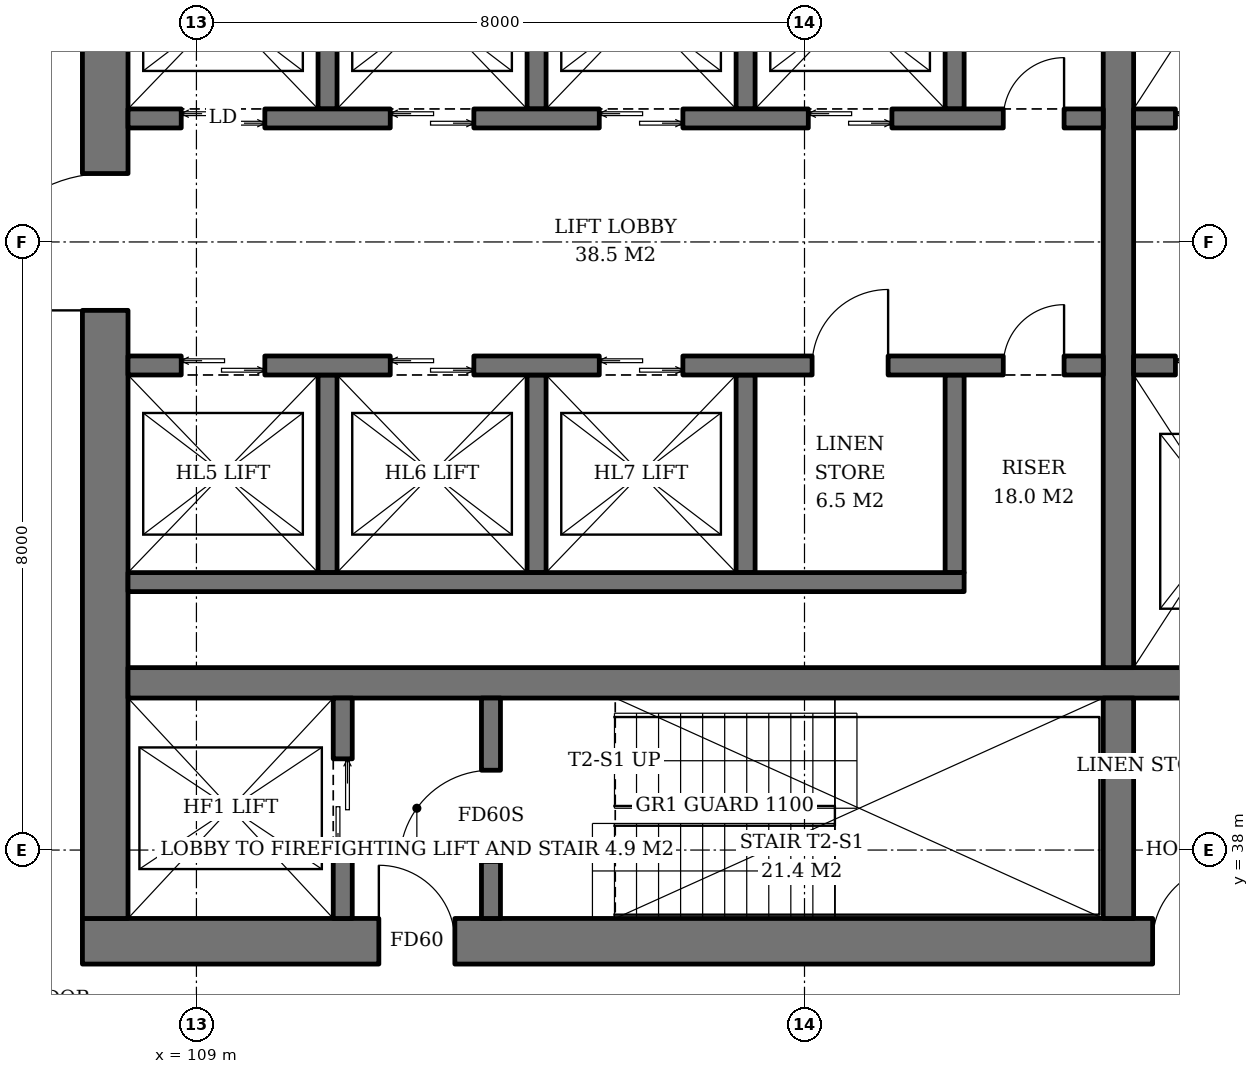
"""IFC4 building model, lengths in metres.
Left out: names, types, materials, properties, quantities, classifications, styles, units other than length and angle.
Written with IfcOpenShell. Run it as: python <this file> out.ifc"""

import sys

from ifc_helpers import new_model, si_unit, direction, frame, frame_2d, origin, place, context, subcontext, project, spatial, rectangle, extrude, element, fill, save


model = new_model("IFC4")
c1 = context("Model", 3, precision=1e-05, world=origin(), true_north=direction((0.0, 1.0)))
c2 = subcontext(c1, "Body", "Model", "MODEL_VIEW")
j1 = project(units=[si_unit("LENGTHUNIT", "METRE"), si_unit("PLANEANGLEUNIT", "RADIAN")], contexts=[c1])
p1 = place(None, origin())
s1 = spatial("IfcSite", under=j1, at=p1, CompositionType="ELEMENT")
p2 = place(p1, origin())
s2 = spatial("IfcBuilding", under=s1, at=p2, CompositionType="ELEMENT")
p3 = place(p2, frame((0.0, 0.0, 100.8)))
s3 = spatial("IfcBuildingStorey", under=s2, at=p3, CompositionType="ELEMENT", Elevation=100.8)
p4 = place(p3, frame((107.5, 36.8, 0.0), z_axis=(0.0, 0.0, 1.0), x_axis=(1.0, 0.0, 0.0)))
e1 = element("IfcWall", 1, at=p4, inside=s3, PredefinedType="SHEAR", context=c2, shape_type="SweptSolid", body=[
    extrude(rectangle(XDim=19.0, YDim=0.6, at=frame_2d((9.5, 0.0))), origin(), (0.0, 0.0, 1.0), 3.8),
])
p5 = place(p4, frame((3.9, 0.0, 0.0)))
e2 = element("IfcOpeningElement", 2, at=p5, cuts=e1, PredefinedType="OPENING", context=c2, shape_type="SweptSolid", body=[
    extrude(rectangle(XDim=1.0, YDim=2.1, at=frame_2d((0.5, 1.05))), frame((0.0, 0.31, 0.0), z_axis=(0.0, -1.0, 0.0), x_axis=(1.0, 0.0, 0.0)), (0.0, 0.0, 1.0), 0.62),
])
p6 = place(p4, frame((14.08, 0.0, 0.0)))
e3 = element("IfcOpeningElement", 3, at=p6, cuts=e1, PredefinedType="OPENING", context=c2, shape_type="SweptSolid", body=[
    extrude(rectangle(XDim=1.0, YDim=2.1, at=frame_2d((0.5, 1.05))), frame((0.0, 0.31, 0.0), z_axis=(0.0, -1.0, 0.0), x_axis=(1.0, 0.0, 0.0)), (0.0, 0.0, 1.0), 0.62),
])
p7 = place(p4, frame((15.615, 0.0, 0.0)))
e4 = element("IfcOpeningElement", 4, at=p7, cuts=e1, PredefinedType="OPENING", context=c2, shape_type="SweptSolid", body=[
    extrude(rectangle(XDim=1.0, YDim=2.1, at=frame_2d((0.5, 1.05))), frame((0.0, 0.31, 0.0), z_axis=(0.0, -1.0, 0.0), x_axis=(1.0, 0.0, 0.0)), (0.0, 0.0, 1.0), 0.62),
])
p8 = place(p4, frame((17.188, 0.0, 0.0)))
e5 = element("IfcOpeningElement", 5, at=p8, cuts=e1, PredefinedType="OPENING", context=c2, shape_type="SweptSolid", body=[
    extrude(rectangle(XDim=1.0, YDim=2.1, at=frame_2d((0.5, 1.05))), frame((0.0, 0.31, 0.0), z_axis=(0.0, -1.0, 0.0), x_axis=(1.0, 0.0, 0.0)), (0.0, 0.0, 1.0), 0.62),
])
p9 = place(p3, frame((107.8, 37.1, 0.0), z_axis=(0.0, 0.0, 1.0), x_axis=(0.0, 1.0, 0.0)))
e6 = element("IfcWall", 6, at=p9, inside=s3, PredefinedType="SHEAR", context=c2, shape_type="SweptSolid", body=[
    extrude(rectangle(XDim=17.8, YDim=0.6, at=frame_2d((8.9, 0.0))), origin(), (0.0, 0.0, 1.0), 3.8),
])
p10 = place(p9, frame((8.0, 0.0, 0.0)))
e7 = element("IfcOpeningElement", 7, at=p10, cuts=e6, PredefinedType="OPENING", context=c2, shape_type="SweptSolid", body=[
    extrude(rectangle(XDim=1.8, YDim=2.4, at=frame_2d((0.9, 1.2))), frame((0.0, 0.31, 0.0), z_axis=(0.0, -1.0, 0.0), x_axis=(1.0, 0.0, 0.0)), (0.0, 0.0, 1.0), 0.62),
])
p11 = place(p3, frame((108.1, 40.2, 0.0), z_axis=(0.0, 0.0, 1.0), x_axis=(1.0, 0.0, 0.0)))
e8 = element("IfcWall", 8, at=p11, inside=s3, PredefinedType="SHEAR", context=c2, shape_type="SweptSolid", body=[
    extrude(rectangle(XDim=17.8, YDim=0.4, at=frame_2d((8.9, 0.0))), origin(), (0.0, 0.0, 1.0), 3.8),
])
p12 = place(p3, frame((121.13, 37.1, 0.0), z_axis=(0.0, 0.0, 1.0), x_axis=(0.0, 1.0, 0.0)))
e9 = element("IfcWall", 9, at=p12, inside=s3, PredefinedType="SHEAR", context=c2, shape_type="SweptSolid", body=[
    extrude(rectangle(XDim=2.9, YDim=0.4, at=frame_2d((1.45, 0.0))), origin(), (0.0, 0.0, 1.0), 3.8),
])
p13 = place(p3, frame((121.13, 40.4, 0.0), z_axis=(0.0, 0.0, 1.0), x_axis=(0.0, 1.0, 0.0)))
e10 = element("IfcWall", 10, at=p13, inside=s3, PredefinedType="SHEAR", context=c2, shape_type="SweptSolid", body=[
    extrude(rectangle(XDim=11.2, YDim=0.4, at=frame_2d((5.6, 0.0))), origin(), (0.0, 0.0, 1.0), 3.8),
])
p14 = place(p3, frame((110.925, 37.1, 0.0), z_axis=(0.0, 0.0, 1.0), x_axis=(0.0, 1.0, 0.0)))
e11 = element("IfcWall", 11, at=p14, inside=s3, PredefinedType="SHEAR", context=c2, shape_type="SweptSolid", body=[
    extrude(rectangle(XDim=2.9, YDim=0.25, at=frame_2d((1.45, 0.0))), origin(), (0.0, 0.0, 1.0), 3.8),
])
p15 = place(p14, frame((0.8, 0.0, 0.0)))
e12 = element("IfcOpeningElement", 12, at=p15, cuts=e11, PredefinedType="OPENING", context=c2, shape_type="SweptSolid", body=[
    extrude(rectangle(XDim=1.3, YDim=2.2, at=frame_2d((0.65, 1.1))), frame((0.0, 0.135, 0.0), z_axis=(0.0, -1.0, 0.0), x_axis=(1.0, 0.0, 0.0)), (0.0, 0.0, 1.0), 0.27),
])
p16 = place(p3, frame((112.875, 37.1, 0.0), z_axis=(0.0, 0.0, 1.0), x_axis=(0.0, 1.0, 0.0)))
e13 = element("IfcWall", 13, at=p16, inside=s3, PredefinedType="SHEAR", context=c2, shape_type="SweptSolid", body=[
    extrude(rectangle(XDim=2.9, YDim=0.25, at=frame_2d((1.45, 0.0))), origin(), (0.0, 0.0, 1.0), 3.8),
])
p17 = place(p16, frame((0.75, 0.0, 0.0)))
e14 = element("IfcOpeningElement", 14, at=p17, cuts=e13, PredefinedType="OPENING", context=c2, shape_type="SweptSolid", body=[
    extrude(rectangle(XDim=1.2, YDim=2.1, at=frame_2d((0.6, 1.05))), frame((0.0, 0.135, 0.0), z_axis=(0.0, -1.0, 0.0), x_axis=(1.0, 0.0, 0.0)), (0.0, 0.0, 1.0), 0.27),
])
for number, where, z_axis, x_axis in (
    (15, (110.725, 47.75, 0.0), (0.0, 0.0, 1.0), (0.0, 1.0, 0.0)),
    (16, (113.475, 47.75, 0.0), (0.0, 0.0, 1.0), (0.0, 1.0, 0.0)),
    (17, (116.225, 47.75, 0.0), (0.0, 0.0, 1.0), (0.0, 1.0, 0.0)),
    (18, (118.975, 47.75, 0.0), (0.0, 0.0, 1.0), (0.0, 1.0, 0.0)),
):
    element("IfcWall", number, at=place(p3, frame(where, z_axis=z_axis, x_axis=x_axis)), inside=s3, PredefinedType="SHEAR", context=c2, shape_type="SweptSolid", body=[
        extrude(rectangle(XDim=2.6, YDim=0.25, at=frame_2d((1.3, 0.0))), origin(), (0.0, 0.0, 1.0), 3.8),
    ])
p18 = place(p3, frame((108.1, 47.625, 0.0), z_axis=(0.0, 0.0, 1.0), x_axis=(1.0, 0.0, 0.0)))
e19 = element("IfcWall", 19, at=p18, inside=s3, PredefinedType="SHEAR", context=c2, shape_type="SweptSolid", body=[
    extrude(rectangle(XDim=12.83, YDim=0.25, at=frame_2d((6.415, 0.0))), origin(), (0.0, 0.0, 1.0), 3.8),
])
p19 = place(p18, frame((0.7, 0.0, 0.0)))
e20 = element("IfcOpeningElement", 20, at=p19, cuts=e19, PredefinedType="OPENING", context=c2, shape_type="SweptSolid", body=[
    extrude(rectangle(XDim=1.1, YDim=2.2, at=frame_2d((0.55, 1.1))), frame((0.0, 0.135, 0.0), z_axis=(0.0, -1.0, 0.0), x_axis=(1.0, 0.0, 0.0)), (0.0, 0.0, 1.0), 0.27),
])
p20 = place(p18, frame((3.45, 0.0, 0.0)))
e21 = element("IfcOpeningElement", 21, at=p20, cuts=e19, PredefinedType="OPENING", context=c2, shape_type="SweptSolid", body=[
    extrude(rectangle(XDim=1.1, YDim=2.2, at=frame_2d((0.55, 1.1))), frame((0.0, 0.135, 0.0), z_axis=(0.0, -1.0, 0.0), x_axis=(1.0, 0.0, 0.0)), (0.0, 0.0, 1.0), 0.27),
])
p21 = place(p18, frame((6.2, 0.0, 0.0)))
e22 = element("IfcOpeningElement", 22, at=p21, cuts=e19, PredefinedType="OPENING", context=c2, shape_type="SweptSolid", body=[
    extrude(rectangle(XDim=1.1, YDim=2.2, at=frame_2d((0.55, 1.1))), frame((0.0, 0.135, 0.0), z_axis=(0.0, -1.0, 0.0), x_axis=(1.0, 0.0, 0.0)), (0.0, 0.0, 1.0), 0.27),
])
p22 = place(p18, frame((8.95, 0.0, 0.0)))
e23 = element("IfcOpeningElement", 23, at=p22, cuts=e19, PredefinedType="OPENING", context=c2, shape_type="SweptSolid", body=[
    extrude(rectangle(XDim=1.1, YDim=2.2, at=frame_2d((0.55, 1.1))), frame((0.0, 0.135, 0.0), z_axis=(0.0, -1.0, 0.0), x_axis=(1.0, 0.0, 0.0)), (0.0, 0.0, 1.0), 0.27),
])
p23 = place(p18, frame((11.515, 0.0, 0.0)))
e24 = element("IfcOpeningElement", 24, at=p23, cuts=e19, PredefinedType="OPENING", context=c2, shape_type="SweptSolid", body=[
    extrude(rectangle(XDim=0.8, YDim=2.0, at=frame_2d((0.4, 1.0))), frame((0.0, 0.135, 0.0), z_axis=(0.0, -1.0, 0.0), x_axis=(1.0, 0.0, 0.0)), (0.0, 0.0, 1.0), 0.27),
])
for number, where, z_axis, x_axis in (
    (25, (110.725, 44.25, 0.0), (0.0, 0.0, 1.0), (0.0, -1.0, 0.0)),
    (26, (113.475, 44.25, 0.0), (0.0, 0.0, 1.0), (0.0, -1.0, 0.0)),
    (27, (116.225, 44.25, 0.0), (0.0, 0.0, 1.0), (0.0, -1.0, 0.0)),
    (28, (118.975, 44.25, 0.0), (0.0, 0.0, 1.0), (0.0, -1.0, 0.0)),
):
    element("IfcWall", number, at=place(p3, frame(where, z_axis=z_axis, x_axis=x_axis)), inside=s3, PredefinedType="SHEAR", context=c2, shape_type="SweptSolid", body=[
        extrude(rectangle(XDim=2.6, YDim=0.25, at=frame_2d((1.3, 0.0))), origin(), (0.0, 0.0, 1.0), 3.8),
    ])
p24 = place(p3, frame((108.1, 41.525, 0.0), z_axis=(0.0, 0.0, 1.0), x_axis=(1.0, 0.0, 0.0)))
e29 = element("IfcWall", 29, at=p24, inside=s3, PredefinedType="SHEAR", context=c2, shape_type="SweptSolid", body=[
    extrude(rectangle(XDim=11.0, YDim=0.25, at=frame_2d((5.5, 0.0))), origin(), (0.0, 0.0, 1.0), 3.8),
])
p25 = place(p3, frame((108.1, 44.375, 0.0), z_axis=(0.0, 0.0, 1.0), x_axis=(1.0, 0.0, 0.0)))
e30 = element("IfcWall", 30, at=p25, inside=s3, PredefinedType="SHEAR", context=c2, shape_type="SweptSolid", body=[
    extrude(rectangle(XDim=12.83, YDim=0.25, at=frame_2d((6.415, 0.0))), origin(), (0.0, 0.0, 1.0), 3.8),
])
p26 = place(p25, frame((0.7, 0.0, 0.0)))
e31 = element("IfcOpeningElement", 31, at=p26, cuts=e30, PredefinedType="OPENING", context=c2, shape_type="SweptSolid", body=[
    extrude(rectangle(XDim=1.1, YDim=2.2, at=frame_2d((0.55, 1.1))), frame((0.0, 0.135, 0.0), z_axis=(0.0, -1.0, 0.0), x_axis=(1.0, 0.0, 0.0)), (0.0, 0.0, 1.0), 0.27),
])
p27 = place(p25, frame((3.45, 0.0, 0.0)))
e32 = element("IfcOpeningElement", 32, at=p27, cuts=e30, PredefinedType="OPENING", context=c2, shape_type="SweptSolid", body=[
    extrude(rectangle(XDim=1.1, YDim=2.2, at=frame_2d((0.55, 1.1))), frame((0.0, 0.135, 0.0), z_axis=(0.0, -1.0, 0.0), x_axis=(1.0, 0.0, 0.0)), (0.0, 0.0, 1.0), 0.27),
])
p28 = place(p25, frame((6.2, 0.0, 0.0)))
e33 = element("IfcOpeningElement", 33, at=p28, cuts=e30, PredefinedType="OPENING", context=c2, shape_type="SweptSolid", body=[
    extrude(rectangle(XDim=1.1, YDim=2.2, at=frame_2d((0.55, 1.1))), frame((0.0, 0.135, 0.0), z_axis=(0.0, -1.0, 0.0), x_axis=(1.0, 0.0, 0.0)), (0.0, 0.0, 1.0), 0.27),
])
p29 = place(p25, frame((9.0, 0.0, 0.0)))
e34 = element("IfcOpeningElement", 34, at=p29, cuts=e30, PredefinedType="OPENING", context=c2, shape_type="SweptSolid", body=[
    extrude(rectangle(XDim=1.0, YDim=2.1, at=frame_2d((0.5, 1.05))), frame((0.0, 0.135, 0.0), z_axis=(0.0, -1.0, 0.0), x_axis=(1.0, 0.0, 0.0)), (0.0, 0.0, 1.0), 0.27),
])
p30 = place(p25, frame((11.515, 0.0, 0.0)))
e35 = element("IfcOpeningElement", 35, at=p30, cuts=e30, PredefinedType="OPENING", context=c2, shape_type="SweptSolid", body=[
    extrude(rectangle(XDim=0.8, YDim=2.0, at=frame_2d((0.4, 1.0))), frame((0.0, 0.135, 0.0), z_axis=(0.0, -1.0, 0.0), x_axis=(1.0, 0.0, 0.0)), (0.0, 0.0, 1.0), 0.27),
])
p31 = place(p3, frame((121.33, 47.625, 0.0), z_axis=(0.0, 0.0, 1.0), x_axis=(1.0, 0.0, 0.0)))
e36 = element("IfcWall", 36, at=p31, inside=s3, PredefinedType="SHEAR", context=c2, shape_type="SweptSolid", body=[
    extrude(rectangle(XDim=4.57, YDim=0.25, at=frame_2d((2.285, 0.0))), origin(), (0.0, 0.0, 1.0), 3.8),
])
p32 = place(p31, frame((0.55, 0.0, 0.0)))
e37 = element("IfcOpeningElement", 37, at=p32, cuts=e36, PredefinedType="OPENING", context=c2, shape_type="SweptSolid", body=[
    extrude(rectangle(XDim=1.4, YDim=2.4, at=frame_2d((0.7, 1.2))), frame((0.0, 0.135, 0.0), z_axis=(0.0, -1.0, 0.0), x_axis=(1.0, 0.0, 0.0)), (0.0, 0.0, 1.0), 0.27),
])
p33 = place(p31, frame((3.26, 0.0, 0.0)))
e38 = element("IfcOpeningElement", 38, at=p33, cuts=e36, PredefinedType="OPENING", context=c2, shape_type="SweptSolid", body=[
    extrude(rectangle(XDim=0.8, YDim=2.0, at=frame_2d((0.4, 1.0))), frame((0.0, 0.135, 0.0), z_axis=(0.0, -1.0, 0.0), x_axis=(1.0, 0.0, 0.0)), (0.0, 0.0, 1.0), 0.27),
])
p34 = place(p3, frame((121.33, 44.375, 0.0), z_axis=(0.0, 0.0, 1.0), x_axis=(1.0, 0.0, 0.0)))
e39 = element("IfcWall", 39, at=p34, inside=s3, PredefinedType="SHEAR", context=c2, shape_type="SweptSolid", body=[
    extrude(rectangle(XDim=4.57, YDim=0.25, at=frame_2d((2.285, 0.0))), origin(), (0.0, 0.0, 1.0), 3.8),
])
p35 = place(p34, frame((0.55, 0.0, 0.0)))
e40 = element("IfcOpeningElement", 40, at=p35, cuts=e39, PredefinedType="OPENING", context=c2, shape_type="SweptSolid", body=[
    extrude(rectangle(XDim=1.4, YDim=2.4, at=frame_2d((0.7, 1.2))), frame((0.0, 0.135, 0.0), z_axis=(0.0, -1.0, 0.0), x_axis=(1.0, 0.0, 0.0)), (0.0, 0.0, 1.0), 0.27),
])
p36 = place(p34, frame((3.26, 0.0, 0.0)))
e41 = element("IfcOpeningElement", 41, at=p36, cuts=e39, PredefinedType="OPENING", context=c2, shape_type="SweptSolid", body=[
    extrude(rectangle(XDim=0.8, YDim=2.0, at=frame_2d((0.4, 1.0))), frame((0.0, 0.135, 0.0), z_axis=(0.0, -1.0, 0.0), x_axis=(1.0, 0.0, 0.0)), (0.0, 0.0, 1.0), 0.27),
])
p37 = place(p15, origin())
e42 = element("IfcDoor", 42, at=p37, inside=s3, OperationType="DOUBLE_DOOR_SLIDING", PredefinedType="DOOR", context=c2, shape_type="SweptSolid", body=[
    extrude(rectangle(XDim=1.3, YDim=2.2, at=frame_2d((0.65, 1.1))), frame((0.0, 0.025, 0.0), z_axis=(0.0, -1.0, 0.0), x_axis=(1.0, 0.0, 0.0)), (0.0, 0.0, 1.0), 0.05),
])
fill(e12, e42)
p38 = place(p17, origin())
e43 = element("IfcDoor", 43, at=p38, inside=s3, OperationType="SINGLE_SWING_LEFT", PredefinedType="DOOR", context=c2, shape_type="SweptSolid", body=[
    extrude(rectangle(XDim=1.2, YDim=2.1, at=frame_2d((0.6, 1.05))), frame((0.0, 0.025, 0.0), z_axis=(0.0, -1.0, 0.0), x_axis=(1.0, 0.0, 0.0)), (0.0, 0.0, 1.0), 0.05),
])
fill(e14, e43)
p39 = place(p19, origin())
e44 = element("IfcDoor", 44, at=p39, inside=s3, OperationType="DOUBLE_DOOR_SLIDING", PredefinedType="DOOR", context=c2, shape_type="SweptSolid", body=[
    extrude(rectangle(XDim=1.1, YDim=2.2, at=frame_2d((0.55, 1.1))), frame((0.0, 0.025, 0.0), z_axis=(0.0, -1.0, 0.0), x_axis=(1.0, 0.0, 0.0)), (0.0, 0.0, 1.0), 0.05),
])
fill(e20, e44)
p40 = place(p20, origin())
e45 = element("IfcDoor", 45, at=p40, inside=s3, OperationType="DOUBLE_DOOR_SLIDING", PredefinedType="DOOR", context=c2, shape_type="SweptSolid", body=[
    extrude(rectangle(XDim=1.1, YDim=2.2, at=frame_2d((0.55, 1.1))), frame((0.0, 0.025, 0.0), z_axis=(0.0, -1.0, 0.0), x_axis=(1.0, 0.0, 0.0)), (0.0, 0.0, 1.0), 0.05),
])
fill(e21, e45)
p41 = place(p21, origin())
e46 = element("IfcDoor", 46, at=p41, inside=s3, OperationType="DOUBLE_DOOR_SLIDING", PredefinedType="DOOR", context=c2, shape_type="SweptSolid", body=[
    extrude(rectangle(XDim=1.1, YDim=2.2, at=frame_2d((0.55, 1.1))), frame((0.0, 0.025, 0.0), z_axis=(0.0, -1.0, 0.0), x_axis=(1.0, 0.0, 0.0)), (0.0, 0.0, 1.0), 0.05),
])
fill(e22, e46)
p42 = place(p22, origin())
e47 = element("IfcDoor", 47, at=p42, inside=s3, OperationType="DOUBLE_DOOR_SLIDING", PredefinedType="DOOR", context=c2, shape_type="SweptSolid", body=[
    extrude(rectangle(XDim=1.1, YDim=2.2, at=frame_2d((0.55, 1.1))), frame((0.0, 0.025, 0.0), z_axis=(0.0, -1.0, 0.0), x_axis=(1.0, 0.0, 0.0)), (0.0, 0.0, 1.0), 0.05),
])
fill(e23, e47)
p43 = place(p23, origin())
e48 = element("IfcDoor", 48, at=p43, inside=s3, OperationType="SINGLE_SWING_RIGHT", PredefinedType="DOOR", context=c2, shape_type="SweptSolid", body=[
    extrude(rectangle(XDim=0.8, YDim=2.0, at=frame_2d((0.4, 1.0))), frame((0.0, 0.025, 0.0), z_axis=(0.0, -1.0, 0.0), x_axis=(1.0, 0.0, 0.0)), (0.0, 0.0, 1.0), 0.05),
])
fill(e24, e48)
p44 = place(p26, origin())
e49 = element("IfcDoor", 49, at=p44, inside=s3, OperationType="DOUBLE_DOOR_SLIDING", PredefinedType="DOOR", context=c2, shape_type="SweptSolid", body=[
    extrude(rectangle(XDim=1.1, YDim=2.2, at=frame_2d((0.55, 1.1))), frame((0.0, 0.025, 0.0), z_axis=(0.0, -1.0, 0.0), x_axis=(1.0, 0.0, 0.0)), (0.0, 0.0, 1.0), 0.05),
])
fill(e31, e49)
p45 = place(p27, origin())
e50 = element("IfcDoor", 50, at=p45, inside=s3, OperationType="DOUBLE_DOOR_SLIDING", PredefinedType="DOOR", context=c2, shape_type="SweptSolid", body=[
    extrude(rectangle(XDim=1.1, YDim=2.2, at=frame_2d((0.55, 1.1))), frame((0.0, 0.025, 0.0), z_axis=(0.0, -1.0, 0.0), x_axis=(1.0, 0.0, 0.0)), (0.0, 0.0, 1.0), 0.05),
])
fill(e32, e50)
p46 = place(p28, origin())
e51 = element("IfcDoor", 51, at=p46, inside=s3, OperationType="DOUBLE_DOOR_SLIDING", PredefinedType="DOOR", context=c2, shape_type="SweptSolid", body=[
    extrude(rectangle(XDim=1.1, YDim=2.2, at=frame_2d((0.55, 1.1))), frame((0.0, 0.025, 0.0), z_axis=(0.0, -1.0, 0.0), x_axis=(1.0, 0.0, 0.0)), (0.0, 0.0, 1.0), 0.05),
])
fill(e33, e51)
p47 = place(p29, origin())
e52 = element("IfcDoor", 52, at=p47, inside=s3, OperationType="SINGLE_SWING_RIGHT", PredefinedType="DOOR", context=c2, shape_type="SweptSolid", body=[
    extrude(rectangle(XDim=1.0, YDim=2.1, at=frame_2d((0.5, 1.05))), frame((0.0, 0.025, 0.0), z_axis=(0.0, -1.0, 0.0), x_axis=(1.0, 0.0, 0.0)), (0.0, 0.0, 1.0), 0.05),
])
fill(e34, e52)
p48 = place(p30, origin())
e53 = element("IfcDoor", 53, at=p48, inside=s3, OperationType="SINGLE_SWING_RIGHT", PredefinedType="DOOR", context=c2, shape_type="SweptSolid", body=[
    extrude(rectangle(XDim=0.8, YDim=2.0, at=frame_2d((0.4, 1.0))), frame((0.0, 0.025, 0.0), z_axis=(0.0, -1.0, 0.0), x_axis=(1.0, 0.0, 0.0)), (0.0, 0.0, 1.0), 0.05),
])
fill(e35, e53)
p49 = place(p32, origin())
e54 = element("IfcDoor", 54, at=p49, inside=s3, OperationType="DOUBLE_DOOR_SLIDING", PredefinedType="DOOR", context=c2, shape_type="SweptSolid", body=[
    extrude(rectangle(XDim=1.4, YDim=2.4, at=frame_2d((0.7, 1.2))), frame((0.0, 0.025, 0.0), z_axis=(0.0, -1.0, 0.0), x_axis=(1.0, 0.0, 0.0)), (0.0, 0.0, 1.0), 0.05),
])
fill(e37, e54)
p50 = place(p35, origin())
e55 = element("IfcDoor", 55, at=p50, inside=s3, OperationType="DOUBLE_DOOR_SLIDING", PredefinedType="DOOR", context=c2, shape_type="SweptSolid", body=[
    extrude(rectangle(XDim=1.4, YDim=2.4, at=frame_2d((0.7, 1.2))), frame((0.0, 0.025, 0.0), z_axis=(0.0, -1.0, 0.0), x_axis=(1.0, 0.0, 0.0)), (0.0, 0.0, 1.0), 0.05),
])
fill(e40, e55)
p51 = place(p5, origin())
e56 = element("IfcDoor", 56, at=p51, inside=s3, OperationType="SINGLE_SWING_LEFT", PredefinedType="DOOR", context=c2, shape_type="SweptSolid", body=[
    extrude(rectangle(XDim=1.0, YDim=2.1, at=frame_2d((0.5, 1.05))), frame((0.0, 0.025, 0.0), z_axis=(0.0, -1.0, 0.0), x_axis=(1.0, 0.0, 0.0)), (0.0, 0.0, 1.0), 0.05),
])
fill(e2, e56)
p52 = place(p10, origin())
e57 = element("IfcDoor", 57, at=p52, inside=s3, OperationType="DOUBLE_DOOR_SINGLE_SWING", PredefinedType="DOOR", context=c2, shape_type="SweptSolid", body=[
    extrude(rectangle(XDim=1.8, YDim=2.4, at=frame_2d((0.9, 1.2))), frame((0.0, 0.025, 0.0), z_axis=(0.0, -1.0, 0.0), x_axis=(1.0, 0.0, 0.0)), (0.0, 0.0, 1.0), 0.05),
])
fill(e7, e57)
p53 = place(p6, origin())
e58 = element("IfcDoor", 58, at=p53, inside=s3, OperationType="SINGLE_SWING_RIGHT", PredefinedType="DOOR", context=c2, shape_type="SweptSolid", body=[
    extrude(rectangle(XDim=1.0, YDim=2.1, at=frame_2d((0.5, 1.05))), frame((0.0, 0.29, 0.0), z_axis=(0.0, -1.0, 0.0), x_axis=(1.0, 0.0, 0.0)), (0.0, 0.0, 1.0), 0.05),
])
fill(e3, e58)
save(model, sys.argv[1])
